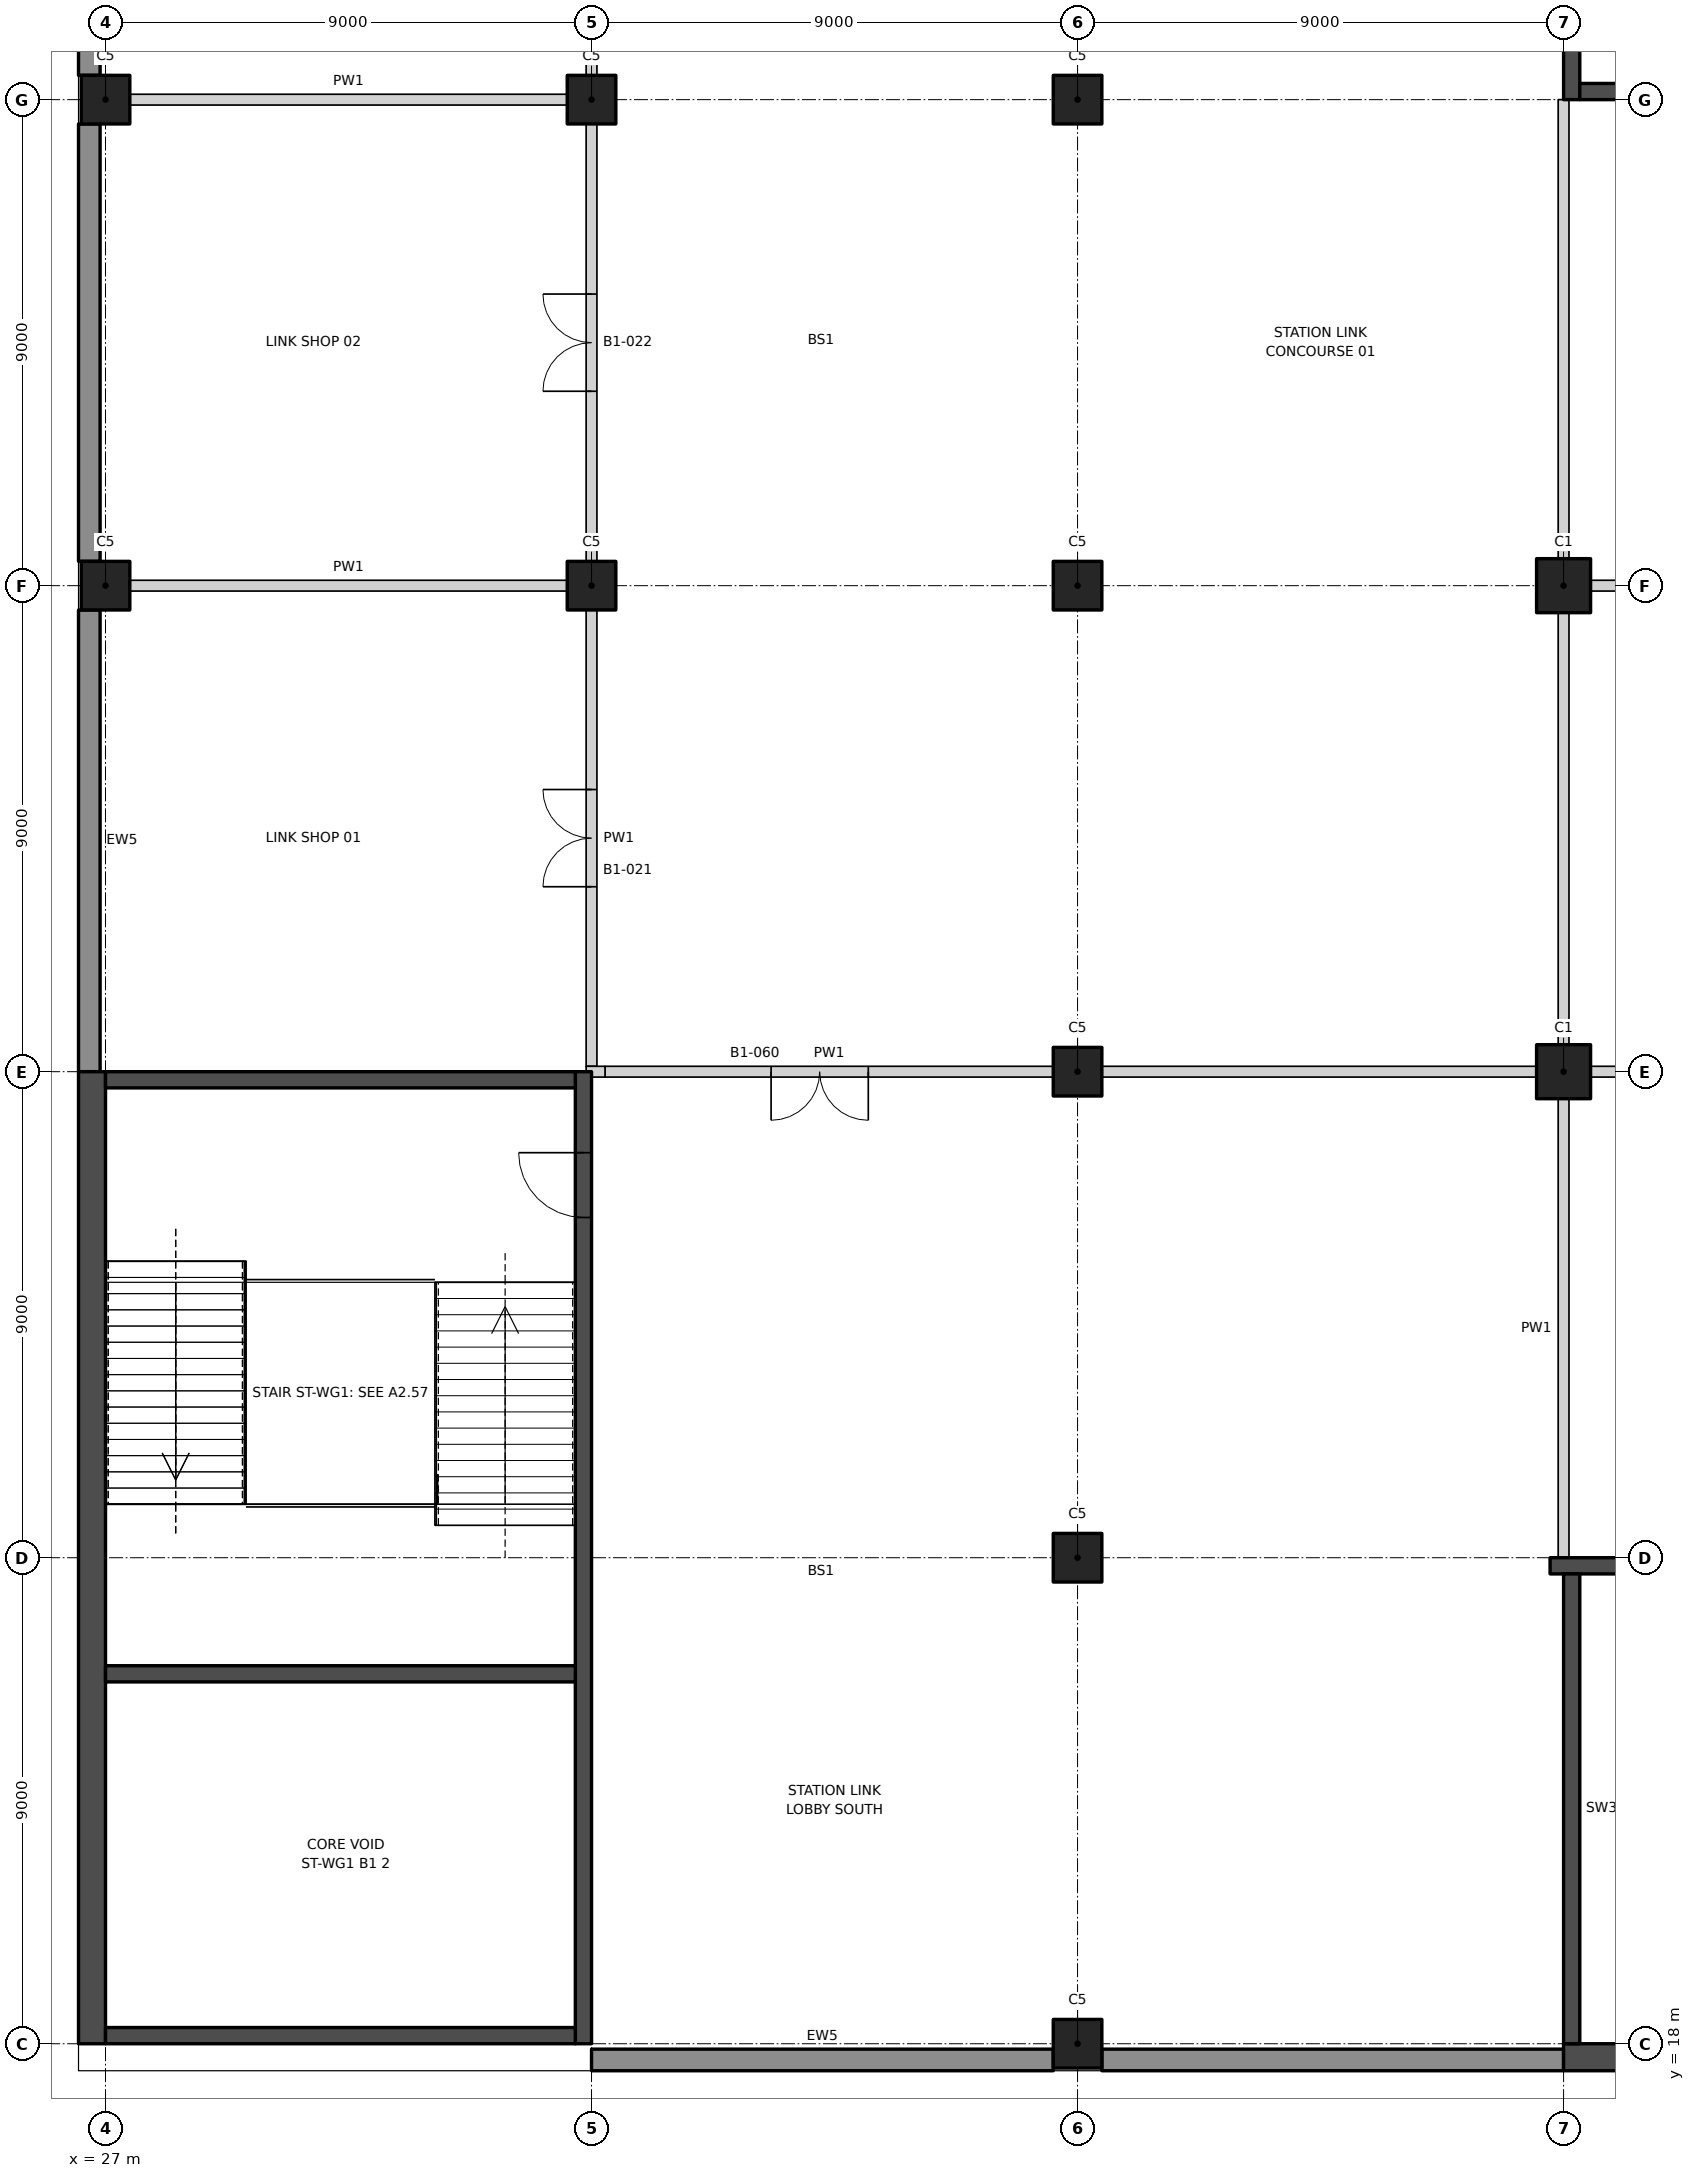
"""IFC4 building model, lengths in metres.
Left out: names, types, materials, properties, quantities, classifications, styles, units other than length and angle.
Written with IfcOpenShell. Run it as: python <this file> out.ifc"""

import sys

from ifc_helpers import new_model, si_unit, direction, frame, frame_2d, origin, origin_2d, place, context, subcontext, project, spatial, rectangle, extrude, element, fill, save


model = new_model("IFC4")
c1 = context("Model", 3, precision=1e-05, world=origin(), true_north=direction((0.0, 1.0)))
c2 = subcontext(c1, "Body", "Model", "MODEL_VIEW")
j1 = project(units=[si_unit("LENGTHUNIT", "METRE"), si_unit("PLANEANGLEUNIT", "RADIAN")], contexts=[c1])
p1 = place(None, origin())
s1 = spatial("IfcSite", under=j1, at=p1, CompositionType="ELEMENT")
p2 = place(p1, origin())
s2 = spatial("IfcBuilding", under=s1, at=p2, CompositionType="ELEMENT")
p3 = place(p2, frame((0.0, 0.0, -6.0)))
s3 = spatial("IfcBuildingStorey", under=s2, at=p3, CompositionType="ELEMENT", Elevation=-6.0)
for number, where, z_axis, x_axis in (
    (1, (54.0, 36.0, 0.0), (0.0, 0.0, 1.0), (1.0, 0.0, 0.0)),
    (2, (54.0, 45.0, 0.0), (0.0, 0.0, 1.0), (1.0, 0.0, 0.0)),
):
    element("IfcColumn", number, at=place(p3, frame(where, z_axis=z_axis, x_axis=x_axis)), inside=s3, PredefinedType="COLUMN", context=c2, shape_type="SweptSolid", body=[
        extrude(rectangle(XDim=1.0, YDim=1.0, at=origin_2d()), origin(), (0.0, 0.0, 1.0), 6.0),
    ])
for number, where, z_axis, x_axis in (
    (3, (27.0, 45.0, 0.0), (0.0, 0.0, 1.0), (1.0, 0.0, 0.0)),
    (4, (27.0, 54.0, 0.0), (0.0, 0.0, 1.0), (1.0, 0.0, 0.0)),
    (5, (36.0, 45.0, 0.0), (0.0, 0.0, 1.0), (1.0, 0.0, 0.0)),
    (6, (36.0, 54.0, 0.0), (0.0, 0.0, 1.0), (1.0, 0.0, 0.0)),
    (7, (45.0, 18.0, 0.0), (0.0, 0.0, 1.0), (1.0, 0.0, 0.0)),
    (8, (45.0, 27.0, 0.0), (0.0, 0.0, 1.0), (1.0, 0.0, 0.0)),
    (9, (45.0, 36.0, 0.0), (0.0, 0.0, 1.0), (1.0, 0.0, 0.0)),
    (10, (45.0, 45.0, 0.0), (0.0, 0.0, 1.0), (1.0, 0.0, 0.0)),
    (11, (45.0, 54.0, 0.0), (0.0, 0.0, 1.0), (1.0, 0.0, 0.0)),
):
    element("IfcColumn", number, at=place(p3, frame(where, z_axis=z_axis, x_axis=x_axis)), inside=s3, PredefinedType="COLUMN", context=c2, shape_type="SweptSolid", body=[
        extrude(rectangle(XDim=0.9, YDim=0.9, at=origin_2d()), origin(), (0.0, 0.0, 1.0), 6.0),
    ])
p4 = place(p3, frame((45.45, 36.0, 0.0), z_axis=(0.0, 0.0, 1.0), x_axis=(1.0, 0.0, 0.0)))
e12 = element("IfcWall", 12, at=p4, inside=s3, PredefinedType="PARTITIONING", context=c2, shape_type="SweptSolid", body=[
    extrude(rectangle(XDim=8.05, YDim=0.2, at=frame_2d((4.025, 0.0))), origin(), (0.0, 0.0, 1.0), 4.65),
])
p5 = place(p3, frame((36.25, 36.0, 0.0), z_axis=(0.0, 0.0, 1.0), x_axis=(1.0, 0.0, 0.0)))
e13 = element("IfcWall", 13, at=p5, inside=s3, PredefinedType="PARTITIONING", context=c2, shape_type="SweptSolid", body=[
    extrude(rectangle(XDim=8.3, YDim=0.2, at=frame_2d((4.15, 0.0))), origin(), (0.0, 0.0, 1.0), 4.65),
])
p6 = place(p5, frame((3.075, 0.0, 0.0)))
e14 = element("IfcOpeningElement", 14, at=p6, cuts=e13, PredefinedType="OPENING", context=c2, shape_type="SweptSolid", body=[
    extrude(rectangle(XDim=1.8, YDim=2.1, at=frame_2d((0.9, 1.05))), frame((0.0, 0.11, 0.0), z_axis=(0.0, -1.0, 0.0), x_axis=(1.0, 0.0, 0.0)), (0.0, 0.0, 1.0), 0.22),
])
p7 = place(p3, frame((54.5, 36.0, 0.0), z_axis=(0.0, 0.0, 1.0), x_axis=(1.0, 0.0, 0.0)))
e15 = element("IfcWall", 15, at=p7, inside=s3, PredefinedType="PARTITIONING", context=c2, shape_type="SweptSolid", body=[
    extrude(rectangle(XDim=8.05, YDim=0.2, at=frame_2d((4.025, 0.0))), origin(), (0.0, 0.0, 1.0), 4.65),
])
p8 = place(p3, frame((27.45, 45.0, 0.0), z_axis=(0.0, 0.0, 1.0), x_axis=(1.0, 0.0, 0.0)))
e16 = element("IfcWall", 16, at=p8, inside=s3, PredefinedType="PARTITIONING", context=c2, shape_type="SweptSolid", body=[
    extrude(rectangle(XDim=8.1, YDim=0.2, at=frame_2d((4.05, 0.0))), origin(), (0.0, 0.0, 1.0), 4.65),
])
p9 = place(p3, frame((54.5, 45.0, 0.0), z_axis=(0.0, 0.0, 1.0), x_axis=(1.0, 0.0, 0.0)))
e17 = element("IfcWall", 17, at=p9, inside=s3, PredefinedType="PARTITIONING", context=c2, shape_type="SweptSolid", body=[
    extrude(rectangle(XDim=8.05, YDim=0.2, at=frame_2d((4.025, 0.0))), origin(), (0.0, 0.0, 1.0), 4.65),
])
p10 = place(p3, frame((27.45, 54.0, 0.0), z_axis=(0.0, 0.0, 1.0), x_axis=(1.0, 0.0, 0.0)))
e18 = element("IfcWall", 18, at=p10, inside=s3, PredefinedType="PARTITIONING", context=c2, shape_type="SweptSolid", body=[
    extrude(rectangle(XDim=8.1, YDim=0.2, at=frame_2d((4.05, 0.0))), origin(), (0.0, 0.0, 1.0), 4.65),
])
p11 = place(p3, frame((36.0, 36.1, 0.0), z_axis=(0.0, 0.0, 1.0), x_axis=(0.0, 1.0, 0.0)))
e19 = element("IfcWall", 19, at=p11, inside=s3, PredefinedType="PARTITIONING", context=c2, shape_type="SweptSolid", body=[
    extrude(rectangle(XDim=8.45, YDim=0.2, at=frame_2d((4.225, 0.0))), origin(), (0.0, 0.0, 1.0), 4.65),
])
p12 = place(p11, frame((3.325, 0.0, 0.0)))
e20 = element("IfcOpeningElement", 20, at=p12, cuts=e19, PredefinedType="OPENING", context=c2, shape_type="SweptSolid", body=[
    extrude(rectangle(XDim=1.8, YDim=2.1, at=frame_2d((0.9, 1.05))), frame((0.0, 0.11, 0.0), z_axis=(0.0, -1.0, 0.0), x_axis=(1.0, 0.0, 0.0)), (0.0, 0.0, 1.0), 0.22),
])
p13 = place(p3, frame((36.0, 45.45, 0.0), z_axis=(0.0, 0.0, 1.0), x_axis=(0.0, 1.0, 0.0)))
e21 = element("IfcWall", 21, at=p13, inside=s3, PredefinedType="PARTITIONING", context=c2, shape_type="SweptSolid", body=[
    extrude(rectangle(XDim=8.1, YDim=0.2, at=frame_2d((4.05, 0.0))), origin(), (0.0, 0.0, 1.0), 4.65),
])
p14 = place(p13, frame((3.15, 0.0, 0.0)))
e22 = element("IfcOpeningElement", 22, at=p14, cuts=e21, PredefinedType="OPENING", context=c2, shape_type="SweptSolid", body=[
    extrude(rectangle(XDim=1.8, YDim=2.1, at=frame_2d((0.9, 1.05))), frame((0.0, 0.11, 0.0), z_axis=(0.0, -1.0, 0.0), x_axis=(1.0, 0.0, 0.0)), (0.0, 0.0, 1.0), 0.22),
])
p15 = place(p3, frame((36.0, 54.45, 0.0), z_axis=(0.0, 0.0, 1.0), x_axis=(0.0, 1.0, 0.0)))
e23 = element("IfcWall", 23, at=p15, inside=s3, PredefinedType="PARTITIONING", context=c2, shape_type="SweptSolid", body=[
    extrude(rectangle(XDim=8.1, YDim=0.2, at=frame_2d((4.05, 0.0))), origin(), (0.0, 0.0, 1.0), 4.65),
])
p16 = place(p15, frame((3.15, 0.0, 0.0)))
e24 = element("IfcOpeningElement", 24, at=p16, cuts=e23, PredefinedType="OPENING", context=c2, shape_type="SweptSolid", body=[
    extrude(rectangle(XDim=1.8, YDim=2.1, at=frame_2d((0.9, 1.05))), frame((0.0, 0.11, 0.0), z_axis=(0.0, -1.0, 0.0), x_axis=(1.0, 0.0, 0.0)), (0.0, 0.0, 1.0), 0.22),
])
p17 = place(p3, frame((54.0, 27.0, 0.0), z_axis=(0.0, 0.0, 1.0), x_axis=(0.0, 1.0, 0.0)))
e25 = element("IfcWall", 25, at=p17, inside=s3, PredefinedType="PARTITIONING", context=c2, shape_type="SweptSolid", body=[
    extrude(rectangle(XDim=8.5, YDim=0.2, at=frame_2d((4.25, 0.0))), origin(), (0.0, 0.0, 1.0), 4.65),
])
p18 = place(p3, frame((54.0, 36.5, 0.0), z_axis=(0.0, 0.0, 1.0), x_axis=(0.0, 1.0, 0.0)))
e26 = element("IfcWall", 26, at=p18, inside=s3, PredefinedType="PARTITIONING", context=c2, shape_type="SweptSolid", body=[
    extrude(rectangle(XDim=8.0, YDim=0.2, at=frame_2d((4.0, 0.0))), origin(), (0.0, 0.0, 1.0), 4.65),
])
p19 = place(p3, frame((54.0, 45.5, 0.0), z_axis=(0.0, 0.0, 1.0), x_axis=(0.0, 1.0, 0.0)))
e27 = element("IfcWall", 27, at=p19, inside=s3, PredefinedType="PARTITIONING", context=c2, shape_type="SweptSolid", body=[
    extrude(rectangle(XDim=8.5, YDim=0.2, at=frame_2d((4.25, 0.0))), origin(), (0.0, 0.0, 1.0), 4.65),
])
for number, where, z_axis, x_axis in (
    (28, (36.0, 17.7, 0.0), (0.0, 0.0, 1.0), (1.0, 0.0, 0.0)),
    (29, (45.45, 17.7, 0.0), (0.0, 0.0, 1.0), (1.0, 0.0, 0.0)),
    (30, (26.7, 44.55, 0.0), (0.0, 0.0, 1.0), (0.0, -1.0, 0.0)),
):
    element("IfcWall", number, at=place(p3, frame(where, z_axis=z_axis, x_axis=x_axis)), inside=s3, PredefinedType="SOLIDWALL", context=c2, shape_type="SweptSolid", body=[
        extrude(rectangle(XDim=8.55, YDim=0.4, at=frame_2d((4.275, 0.0))), origin(), (0.0, 0.0, 1.0), 6.0),
    ])
for number, where, z_axis, x_axis in (
    (31, (26.7, 53.55, 0.0), (0.0, 0.0, 1.0), (0.0, -1.0, 0.0)),
    (32, (26.7, 62.55, 0.0), (0.0, 0.0, 1.0), (0.0, -1.0, 0.0)),
):
    element("IfcWall", number, at=place(p3, frame(where, z_axis=z_axis, x_axis=x_axis)), inside=s3, PredefinedType="SOLIDWALL", context=c2, shape_type="SweptSolid", body=[
        extrude(rectangle(XDim=8.1, YDim=0.4, at=frame_2d((4.05, 0.0))), origin(), (0.0, 0.0, 1.0), 6.0),
    ])
p20 = place(p3, frame((72.0, 26.85, 0.0), z_axis=(0.0, 0.0, 1.0), x_axis=(-1.0, 0.0, 0.0)))
e33 = element("IfcWall", 33, at=p20, inside=s3, PredefinedType="SHEAR", context=c2, shape_type="SweptSolid", body=[
    extrude(rectangle(XDim=18.25, YDim=0.3, at=frame_2d((9.125, 0.0))), origin(), (0.0, 0.0, 1.0), 6.0),
])
p21 = place(p3, frame((72.0, 17.75, 0.0), z_axis=(0.0, 0.0, 1.0), x_axis=(-1.0, 0.0, 0.0)))
e34 = element("IfcWall", 34, at=p21, inside=s3, PredefinedType="SHEAR", context=c2, shape_type="SweptSolid", body=[
    extrude(rectangle(XDim=18.0, YDim=0.5, at=frame_2d((9.0, 0.0))), origin(), (0.0, 0.0, 1.0), 6.0),
])
p22 = place(p3, frame((54.15, 26.7, 0.0), z_axis=(0.0, 0.0, 1.0), x_axis=(0.0, -1.0, 0.0)))
e35 = element("IfcWall", 35, at=p22, inside=s3, PredefinedType="SHEAR", context=c2, shape_type="SweptSolid", body=[
    extrude(rectangle(XDim=8.7, YDim=0.3, at=frame_2d((4.35, 0.0))), origin(), (0.0, 0.0, 1.0), 6.0),
])
p23 = place(p3, frame((54.15, 54.0, 0.0), z_axis=(0.0, 0.0, 1.0), x_axis=(0.0, 1.0, 0.0)))
e36 = element("IfcWall", 36, at=p23, inside=s3, PredefinedType="SHEAR", context=c2, shape_type="SweptSolid", body=[
    extrude(rectangle(XDim=18.0, YDim=0.3, at=frame_2d((9.0, 0.0))), origin(), (0.0, 0.0, 1.0), 6.0),
])
p24 = place(p23, frame((8.6, 0.0, 0.0)))
e37 = element("IfcOpeningElement", 37, at=p24, cuts=e36, PredefinedType="OPENING", context=c2, shape_type="SweptSolid", body=[
    extrude(rectangle(XDim=1.2, YDim=2.1, at=frame_2d((0.6, 1.05))), frame((0.0, 0.16, 0.0), z_axis=(0.0, -1.0, 0.0), x_axis=(1.0, 0.0, 0.0)), (0.0, 0.0, 1.0), 0.32),
])
p25 = place(p3, frame((62.7, 54.15, 0.0), z_axis=(0.0, 0.0, 1.0), x_axis=(-1.0, 0.0, 0.0)))
e38 = element("IfcWall", 38, at=p25, inside=s3, PredefinedType="SHEAR", context=c2, shape_type="SweptSolid", body=[
    extrude(rectangle(XDim=8.4, YDim=0.3, at=frame_2d((4.2, 0.0))), origin(), (0.0, 0.0, 1.0), 6.0),
])
p26 = place(p3, frame((35.85, 36.0, 0.0), z_axis=(0.0, 0.0, 1.0), x_axis=(0.0, -1.0, 0.0)))
e39 = element("IfcWall", 39, at=p26, inside=s3, PredefinedType="SHEAR", context=c2, shape_type="SweptSolid", body=[
    extrude(rectangle(XDim=18.0, YDim=0.3, at=frame_2d((9.0, 0.0))), origin(), (0.0, 0.0, 1.0), 6.0),
])
p27 = place(p26, frame((1.5, 0.0, 0.0)))
e40 = element("IfcOpeningElement", 40, at=p27, cuts=e39, PredefinedType="OPENING", context=c2, shape_type="SweptSolid", body=[
    extrude(rectangle(XDim=1.2, YDim=2.1, at=frame_2d((0.6, 1.05))), frame((0.0, 0.16, 0.0), z_axis=(0.0, -1.0, 0.0), x_axis=(1.0, 0.0, 0.0)), (0.0, 0.0, 1.0), 0.32),
])
p28 = place(p3, frame((26.75, 36.0, 0.0), z_axis=(0.0, 0.0, 1.0), x_axis=(0.0, -1.0, 0.0)))
e41 = element("IfcWall", 41, at=p28, inside=s3, PredefinedType="SHEAR", context=c2, shape_type="SweptSolid", body=[
    extrude(rectangle(XDim=18.0, YDim=0.5, at=frame_2d((9.0, 0.0))), origin(), (0.0, 0.0, 1.0), 6.0),
])
for number, where, z_axis, x_axis in (
    (42, (35.7, 35.85, 0.0), (0.0, 0.0, 1.0), (-1.0, 0.0, 0.0)),
    (43, (35.7, 18.15, 0.0), (0.0, 0.0, 1.0), (-1.0, 0.0, 0.0)),
    (44, (35.7, 24.85, 0.0), (0.0, 0.0, 1.0), (-1.0, 0.0, 0.0)),
):
    element("IfcWall", number, at=place(p3, frame(where, z_axis=z_axis, x_axis=x_axis)), inside=s3, PredefinedType="SHEAR", context=c2, shape_type="SweptSolid", body=[
        extrude(rectangle(XDim=8.7, YDim=0.3, at=frame_2d((4.35, 0.0))), origin(), (0.0, 0.0, 1.0), 6.0),
    ])
p29 = place(p3, frame((35.9, 36.0, 0.0), z_axis=(0.0, 0.0, 1.0), x_axis=(1.0, 0.0, 0.0)))
e45 = element("IfcWall", 45, at=p29, inside=s3, PredefinedType="PARTITIONING", context=c2, shape_type="SweptSolid", body=[
    extrude(rectangle(XDim=0.35, YDim=0.2, at=frame_2d((0.175, 0.0))), origin(), (0.0, 0.0, 1.0), 6.0),
])
p30 = place(p12, origin())
e46 = element("IfcDoor", 46, at=p30, inside=s3, OperationType="DOUBLE_DOOR_DOUBLE_SWING", PredefinedType="DOOR", context=c2, shape_type="SweptSolid", body=[
    extrude(rectangle(XDim=1.8, YDim=2.1, at=frame_2d((0.9, 1.05))), frame((0.0, 0.025, 0.0), z_axis=(0.0, -1.0, 0.0), x_axis=(1.0, 0.0, 0.0)), (0.0, 0.0, 1.0), 0.05),
])
fill(e20, e46)
p31 = place(p14, origin())
e47 = element("IfcDoor", 47, at=p31, inside=s3, OperationType="DOUBLE_DOOR_DOUBLE_SWING", PredefinedType="DOOR", context=c2, shape_type="SweptSolid", body=[
    extrude(rectangle(XDim=1.8, YDim=2.1, at=frame_2d((0.9, 1.05))), frame((0.0, 0.025, 0.0), z_axis=(0.0, -1.0, 0.0), x_axis=(1.0, 0.0, 0.0)), (0.0, 0.0, 1.0), 0.05),
])
fill(e22, e47)
p32 = place(p6, frame((1.8, 0.0, 0.0), z_axis=(0.0, 0.0, 1.0), x_axis=(-1.0, 0.0, 0.0)))
e48 = element("IfcDoor", 48, at=p32, inside=s3, OperationType="DOUBLE_DOOR_DOUBLE_SWING", PredefinedType="DOOR", context=c2, shape_type="SweptSolid", body=[
    extrude(rectangle(XDim=1.8, YDim=2.1, at=frame_2d((0.9, 1.05))), frame((0.0, 0.025, 0.0), z_axis=(0.0, -1.0, 0.0), x_axis=(1.0, 0.0, 0.0)), (0.0, 0.0, 1.0), 0.05),
])
fill(e14, e48)
p33 = place(p27, frame((1.2, 0.0, 0.0), z_axis=(0.0, 0.0, 1.0), x_axis=(-1.0, 0.0, 0.0)))
e49 = element("IfcDoor", 49, at=p33, inside=s3, OperationType="SINGLE_SWING_RIGHT", PredefinedType="DOOR", context=c2, shape_type="SweptSolid", body=[
    extrude(rectangle(XDim=1.2, YDim=2.1, at=frame_2d((0.6, 1.05))), frame((0.0, 0.025, 0.0), z_axis=(0.0, -1.0, 0.0), x_axis=(1.0, 0.0, 0.0)), (0.0, 0.0, 1.0), 0.05),
])
fill(e40, e49)
save(model, sys.argv[1])
